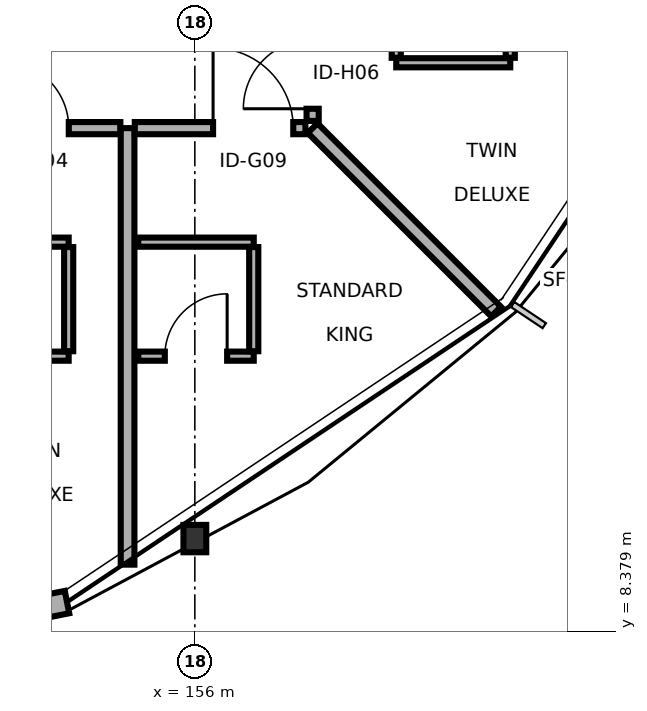
"""IFC4 building model, lengths in metres.
Left out: names, types, materials, properties, quantities, classifications, styles, units other than length and angle.
Written with IfcOpenShell. Run it as: python <this file> out.ifc"""

import sys

from ifc_helpers import new_model, si_unit, direction, frame, frame_2d, origin, origin_2d, place, context, subcontext, project, spatial, rectangle, i_section, extrude, element, fill, save


model = new_model("IFC4")
c1 = context("Model", 3, precision=1e-05, world=origin(), true_north=direction((0.0, 1.0)))
c2 = subcontext(c1, "Body", "Model", "MODEL_VIEW")
j1 = project(units=[si_unit("LENGTHUNIT", "METRE"), si_unit("PLANEANGLEUNIT", "RADIAN")], contexts=[c1])
p1 = place(None, origin())
s1 = spatial("IfcSite", under=j1, at=p1, CompositionType="ELEMENT")
p2 = place(p1, origin())
s2 = spatial("IfcBuilding", under=s1, at=p2, CompositionType="ELEMENT")
p3 = place(p2, frame((0.0, 0.0, 35.1)))
s3 = spatial("IfcBuildingStorey", under=s2, at=p3, CompositionType="ELEMENT", Elevation=35.1)
p4 = place(p3, frame((156.0, 9.6, 0.0), z_axis=(0.0, 0.0, 1.0), x_axis=(1.0, 0.0, 0.0)))
e1 = element("IfcColumn", 1, at=p4, inside=s3, PredefinedType="COLUMN", context=c2, shape_type="SweptSolid", body=[
    extrude(i_section(OverallWidth=0.3, OverallDepth=0.36, WebThickness=0.012, FlangeThickness=0.022, FilletRadius=0.027, at=origin_2d()), origin(), (0.0, 0.0, 1.0), 3.4),
])
p5 = place(p3, frame((147.447, 7.398, 0.0), z_axis=(0.0, 0.0, 1.0), x_axis=(0.980786545094, 0.19508396388, 0.0)))
e2 = element("IfcWall", 2, at=p5, inside=s3, PredefinedType="SOLIDWALL", context=c2, shape_type="SweptSolid", body=[
    extrude(rectangle(XDim=7.006, YDim=0.3, at=frame_2d((3.503, 0.0))), origin(), (0.0, 0.0, 1.0), 2.85),
])
p6 = place(p5, frame((0.812, 0.0, 0.8)))
e3 = element("IfcOpeningElement", 3, at=p6, cuts=e2, PredefinedType="OPENING", context=c2, shape_type="SweptSolid", body=[
    extrude(rectangle(XDim=1.6, YDim=1.5, at=frame_2d((0.8, 0.75))), frame((0.0, 0.16, 0.0), z_axis=(0.0, -1.0, 0.0), x_axis=(1.0, 0.0, 0.0)), (0.0, 0.0, 1.0), 0.32),
])
p7 = place(p5, frame((3.294, 0.0, 0.8)))
e4 = element("IfcOpeningElement", 4, at=p7, cuts=e2, PredefinedType="OPENING", context=c2, shape_type="SweptSolid", body=[
    extrude(rectangle(XDim=1.6, YDim=1.5, at=frame_2d((0.8, 0.75))), frame((0.0, 0.16, 0.0), z_axis=(0.0, -1.0, 0.0), x_axis=(1.0, 0.0, 0.0)), (0.0, 0.0, 1.0), 0.32),
])
p8 = place(p3, frame((152.775, 15.0, 0.0), z_axis=(0.0, 0.0, 1.0), x_axis=(1.0, 0.0, 0.0)))
e5 = element("IfcWall", 5, at=p8, inside=s3, PredefinedType="PARTITIONING", context=c2, shape_type="SweptSolid", body=[
    extrude(rectangle(XDim=2.245, YDim=0.16, at=frame_2d((1.123, 0.0))), origin(), (0.0, 0.0, 1.0), 3.165),
])
p9 = place(p8, frame((0.678, 0.0, 0.0)))
e6 = element("IfcOpeningElement", 6, at=p9, cuts=e5, PredefinedType="OPENING", context=c2, shape_type="SweptSolid", body=[
    extrude(rectangle(XDim=0.888, YDim=2.07, at=frame_2d((0.444, 1.035))), frame((0.0, 0.09, 0.0), z_axis=(0.0, -1.0, 0.0), x_axis=(1.0, 0.0, 0.0)), (0.0, 0.0, 1.0), 0.18),
])
p10 = place(p3, frame((152.82, 12.0, 0.0), z_axis=(0.0, 0.0, 1.0), x_axis=(1.0, 0.0, 0.0)))
e7 = element("IfcWall", 7, at=p10, inside=s3, PredefinedType="PARTITIONING", context=c2, shape_type="SweptSolid", body=[
    extrude(rectangle(XDim=1.52, YDim=0.12, at=frame_2d((0.76, 0.0))), origin(), (0.0, 0.0, 1.0), 3.165),
])
p11 = place(p10, frame((0.35, 0.0, 0.0)))
e8 = element("IfcOpeningElement", 8, at=p11, cuts=e7, PredefinedType="OPENING", context=c2, shape_type="SweptSolid", body=[
    extrude(rectangle(XDim=0.82, YDim=2.08, at=frame_2d((0.41, 1.04))), frame((0.0, 0.07, 0.0), z_axis=(0.0, -1.0, 0.0), x_axis=(1.0, 0.0, 0.0)), (0.0, 0.0, 1.0), 0.14),
])
p12 = place(p3, frame((152.82, 13.5, 0.0), z_axis=(0.0, 0.0, 1.0), x_axis=(1.0, 0.0, 0.0)))
e9 = element("IfcWall", 9, at=p12, inside=s3, PredefinedType="PARTITIONING", context=c2, shape_type="SweptSolid", body=[
    extrude(rectangle(XDim=1.52, YDim=0.12, at=frame_2d((0.76, 0.0))), origin(), (0.0, 0.0, 1.0), 3.165),
])
p13 = place(p3, frame((154.34, 12.065, 0.0), z_axis=(0.0, 0.0, 1.0), x_axis=(0.0, 1.0, 0.0)))
e10 = element("IfcWall", 10, at=p13, inside=s3, PredefinedType="PARTITIONING", context=c2, shape_type="SweptSolid", body=[
    extrude(rectangle(XDim=1.37, YDim=0.12, at=frame_2d((0.685, 0.0))), origin(), (0.0, 0.0, 1.0), 3.165),
])
p14 = place(p3, frame((155.115, 9.257, 0.0), z_axis=(0.0, 0.0, 1.0), x_axis=(0.0, 1.0, 0.0)))
e11 = element("IfcWall", 11, at=p14, inside=s3, PredefinedType="PARTITIONING", context=c2, shape_type="SweptSolid", body=[
    extrude(rectangle(XDim=5.743, YDim=0.18, at=frame_2d((2.872, 0.0))), origin(), (0.0, 0.0, 1.0), 2.65),
])
p15 = place(p3, frame((155.21, 15.0, 0.0), z_axis=(0.0, 0.0, 1.0), x_axis=(1.0, 0.0, 0.0)))
e12 = element("IfcWall", 12, at=p15, inside=s3, PredefinedType="PARTITIONING", context=c2, shape_type="SweptSolid", body=[
    extrude(rectangle(XDim=2.245, YDim=0.16, at=frame_2d((1.123, 0.0))), origin(), (0.0, 0.0, 1.0), 2.75),
])
p16 = place(p15, frame((1.03, 0.0, 0.0)))
e13 = element("IfcOpeningElement", 13, at=p16, cuts=e12, PredefinedType="OPENING", context=c2, shape_type="SweptSolid", body=[
    extrude(rectangle(XDim=1.055, YDim=2.05, at=frame_2d((0.527, 1.025))), frame((0.0, 0.09, 0.0), z_axis=(0.0, -1.0, 0.0), x_axis=(1.0, 0.0, 0.0)), (0.0, 0.0, 1.0), 0.18),
])
p17 = place(p3, frame((155.255, 12.0, 0.0), z_axis=(0.0, 0.0, 1.0), x_axis=(1.0, 0.0, 0.0)))
e14 = element("IfcWall", 14, at=p17, inside=s3, PredefinedType="PARTITIONING", context=c2, shape_type="SweptSolid", body=[
    extrude(rectangle(XDim=1.52, YDim=0.12, at=frame_2d((0.76, 0.0))), origin(), (0.0, 0.0, 1.0), 2.75),
])
p18 = place(p17, frame((0.35, 0.0, 0.0)))
e15 = element("IfcOpeningElement", 15, at=p18, cuts=e14, PredefinedType="OPENING", context=c2, shape_type="SweptSolid", body=[
    extrude(rectangle(XDim=0.82, YDim=2.08, at=frame_2d((0.41, 1.04))), frame((0.0, 0.07, 0.0), z_axis=(0.0, -1.0, 0.0), x_axis=(1.0, 0.0, 0.0)), (0.0, 0.0, 1.0), 0.14),
])
p19 = place(p3, frame((155.255, 13.5, 0.0), z_axis=(0.0, 0.0, 1.0), x_axis=(1.0, 0.0, 0.0)))
e16 = element("IfcWall", 16, at=p19, inside=s3, PredefinedType="PARTITIONING", context=c2, shape_type="SweptSolid", body=[
    extrude(rectangle(XDim=1.52, YDim=0.12, at=frame_2d((0.76, 0.0))), origin(), (0.0, 0.0, 1.0), 2.75),
])
p20 = place(p3, frame((156.775, 12.065, 0.0), z_axis=(0.0, 0.0, 1.0), x_axis=(0.0, 1.0, 0.0)))
e17 = element("IfcWall", 17, at=p20, inside=s3, PredefinedType="PARTITIONING", context=c2, shape_type="SweptSolid", body=[
    extrude(rectangle(XDim=1.37, YDim=0.12, at=frame_2d((0.685, 0.0))), origin(), (0.0, 0.0, 1.0), 3.165),
])
p21 = place(p3, frame((157.55, 15.0, 0.0), z_axis=(0.0, 0.0, 1.0), x_axis=(0.707106781187, -0.707106781187, 0.0)))
e18 = element("IfcWall", 18, at=p21, inside=s3, PredefinedType="PARTITIONING", context=c2, shape_type="SweptSolid", body=[
    extrude(rectangle(XDim=3.413, YDim=0.18, at=frame_2d((1.706, 0.0))), origin(), (0.0, 0.0, 1.0), 2.65),
])
p22 = place(p3, frame((157.55, 15.095, 0.0), z_axis=(0.0, 0.0, 1.0), x_axis=(0.0, 1.0, 0.0)))
e19 = element("IfcWall", 19, at=p22, inside=s3, PredefinedType="PARTITIONING", context=c2, shape_type="SweptSolid", body=[
    extrude(rectangle(XDim=2.33, YDim=0.16, at=frame_2d((1.165, 0.0))), origin(), (0.0, 0.0, 1.0), 2.75),
])
p23 = place(p22, frame((0.16, 0.0, 0.0)))
e20 = element("IfcOpeningElement", 20, at=p23, cuts=e19, PredefinedType="OPENING", context=c2, shape_type="SweptSolid", body=[
    extrude(rectangle(XDim=0.912, YDim=2.13, at=frame_2d((0.456, 1.065))), frame((0.0, 0.09, 0.0), z_axis=(0.0, -1.0, 0.0), x_axis=(1.0, 0.0, 0.0)), (0.0, 0.0, 1.0), 0.18),
])
p24 = place(p3, frame((158.65, 15.86, 0.0), z_axis=(0.0, 0.0, 1.0), x_axis=(1.0, 0.0, 0.0)))
e21 = element("IfcWall", 21, at=p24, inside=s3, PredefinedType="PARTITIONING", context=c2, shape_type="SweptSolid", body=[
    extrude(rectangle(XDim=1.5, YDim=0.12, at=frame_2d((0.75, 0.0))), origin(), (0.0, 0.0, 1.0), 3.165),
])
p25 = place(p3, frame((158.65, 15.925, 0.0), z_axis=(0.0, 0.0, 1.0), x_axis=(0.0, 1.0, 0.0)))
e22 = element("IfcWall", 22, at=p25, inside=s3, PredefinedType="PARTITIONING", context=c2, shape_type="SweptSolid", body=[
    extrude(rectangle(XDim=1.39, YDim=0.12, at=frame_2d((0.695, 0.0))), origin(), (0.0, 0.0, 1.0), 2.75),
])
p26 = place(p3, frame((160.15, 15.925, 0.0), z_axis=(0.0, 0.0, 1.0), x_axis=(0.0, 1.0, 0.0)))
e23 = element("IfcWall", 23, at=p26, inside=s3, PredefinedType="PARTITIONING", context=c2, shape_type="SweptSolid", body=[
    extrude(rectangle(XDim=1.39, YDim=0.12, at=frame_2d((0.695, 0.0))), origin(), (0.0, 0.0, 1.0), 2.75),
])
p27 = place(p26, frame((0.285, 0.0, 0.0)))
e24 = element("IfcOpeningElement", 24, at=p27, cuts=e23, PredefinedType="OPENING", context=c2, shape_type="SweptSolid", body=[
    extrude(rectangle(XDim=0.82, YDim=2.08, at=frame_2d((0.41, 1.04))), frame((0.0, 0.07, 0.0), z_axis=(0.0, -1.0, 0.0), x_axis=(1.0, 0.0, 0.0)), (0.0, 0.0, 1.0), 0.14),
])
p28 = place(p9, origin())
e25 = element("IfcDoor", 25, at=p28, inside=s3, OperationType="SINGLE_SWING_LEFT", PredefinedType="DOOR", context=c2, shape_type="SweptSolid", body=[
    extrude(rectangle(XDim=0.888, YDim=2.07, at=frame_2d((0.444, 1.035))), frame((0.0, 0.025, 0.0), z_axis=(0.0, -1.0, 0.0), x_axis=(1.0, 0.0, 0.0)), (0.0, 0.0, 1.0), 0.05),
])
fill(e6, e25)
p29 = place(p16, origin())
e26 = element("IfcDoor", 26, at=p29, inside=s3, OperationType="SINGLE_SWING_LEFT", PredefinedType="DOOR", context=c2, shape_type="SweptSolid", body=[
    extrude(rectangle(XDim=1.055, YDim=2.05, at=frame_2d((0.527, 1.025))), frame((0.0, 0.025, 0.0), z_axis=(0.0, -1.0, 0.0), x_axis=(1.0, 0.0, 0.0)), (0.0, 0.0, 1.0), 0.05),
])
fill(e13, e26)
p30 = place(p18, origin())
e27 = element("IfcDoor", 27, at=p30, inside=s3, OperationType="SINGLE_SWING_RIGHT", PredefinedType="DOOR", context=c2, shape_type="SweptSolid", body=[
    extrude(rectangle(XDim=0.82, YDim=2.08, at=frame_2d((0.41, 1.04))), frame((0.0, 0.025, 0.0), z_axis=(0.0, -1.0, 0.0), x_axis=(1.0, 0.0, 0.0)), (0.0, 0.0, 1.0), 0.05),
])
fill(e15, e27)
p31 = place(p23, origin())
e28 = element("IfcDoor", 28, at=p31, inside=s3, OperationType="SINGLE_SWING_LEFT", PredefinedType="DOOR", context=c2, shape_type="SweptSolid", body=[
    extrude(rectangle(XDim=0.912, YDim=2.13, at=frame_2d((0.456, 1.065))), frame((0.0, 0.025, 0.0), z_axis=(0.0, -1.0, 0.0), x_axis=(1.0, 0.0, 0.0)), (0.0, 0.0, 1.0), 0.05),
])
fill(e20, e28)
save(model, sys.argv[1])
